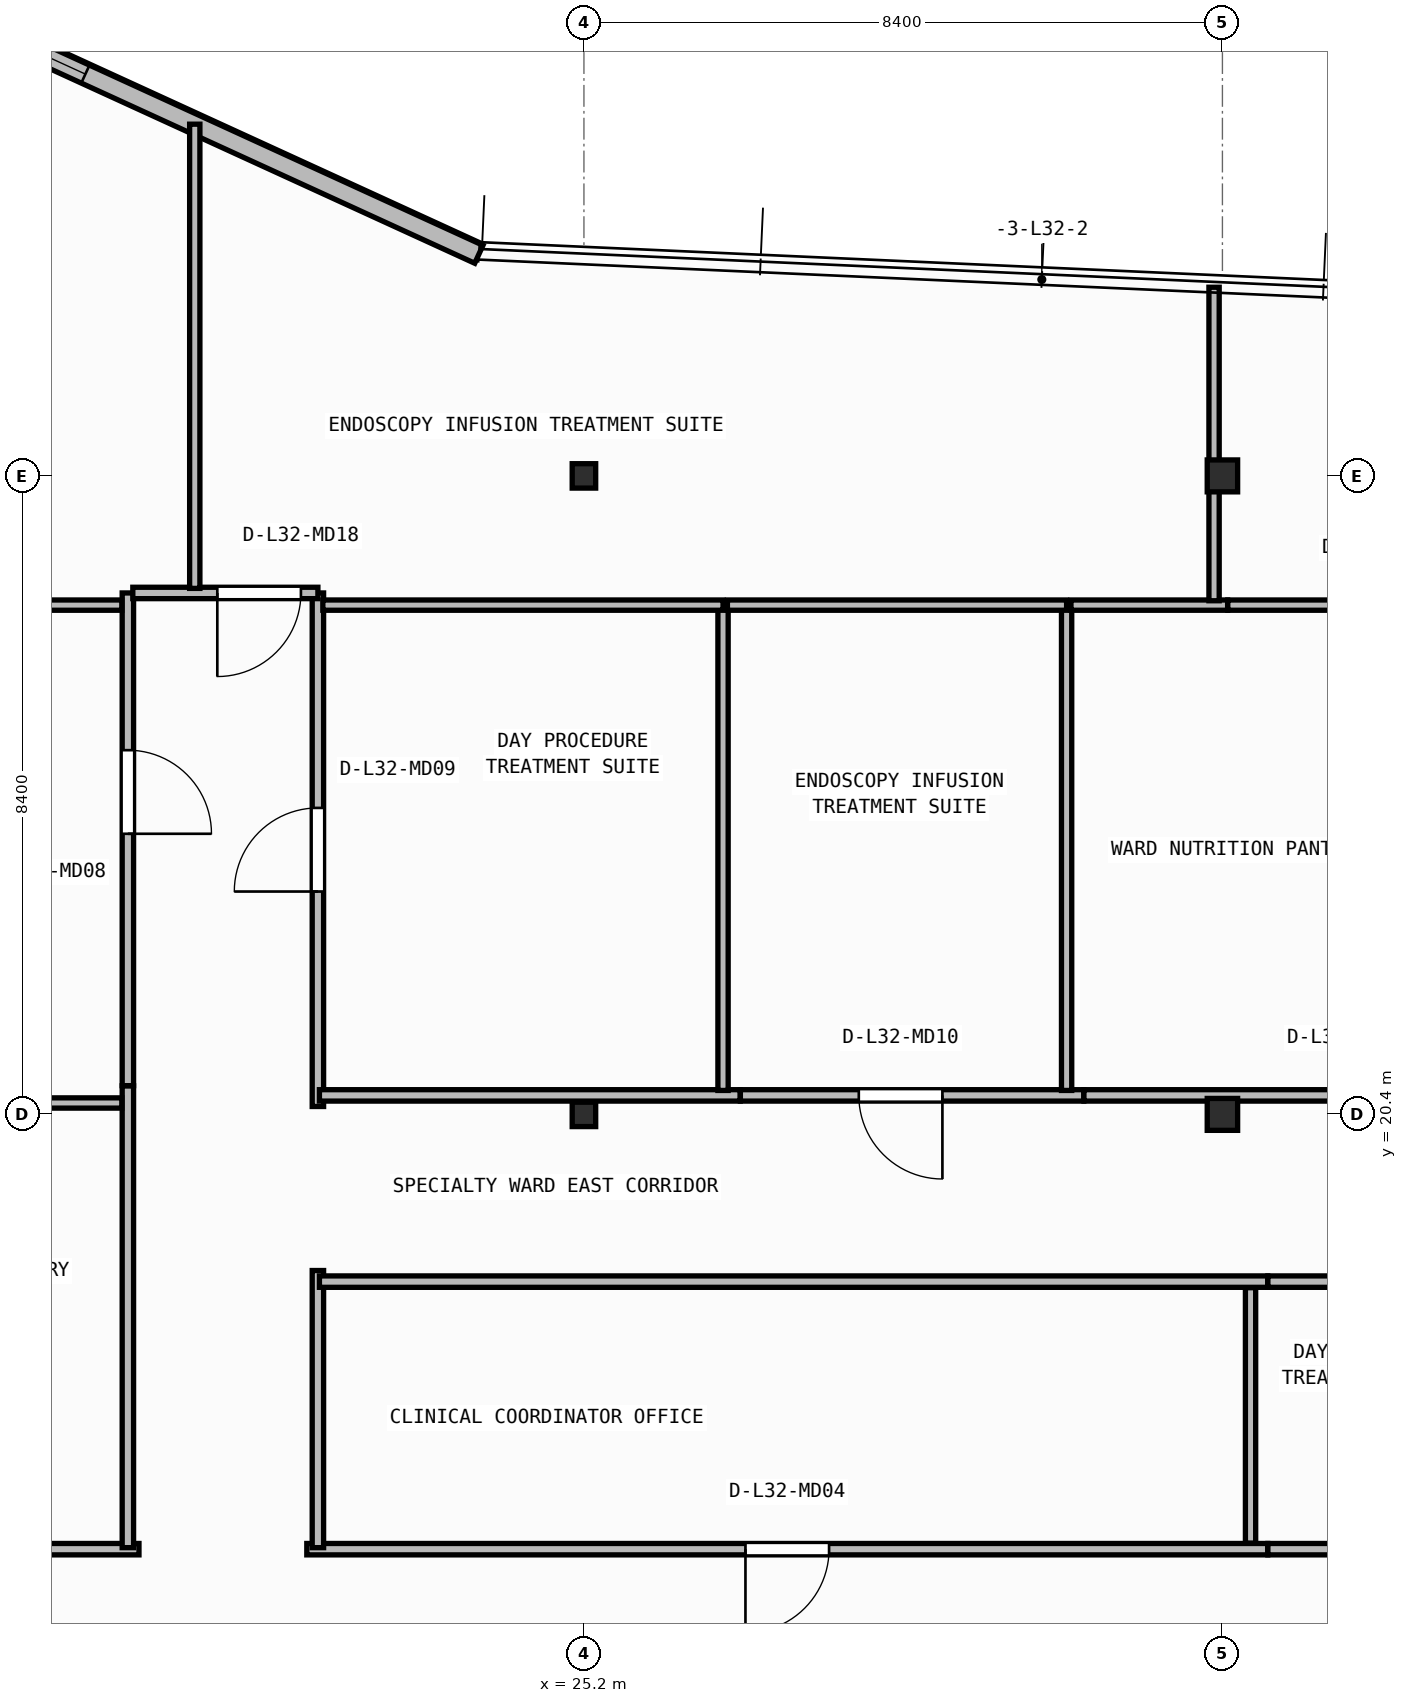
"""IFC4 building model, lengths in metres.
Left out: names, types, materials, properties, quantities, classifications, styles, units other than length and angle.
Written with IfcOpenShell. Run it as: python <this file> out.ifc"""

import sys

from ifc_helpers import new_model, si_unit, direction, frame, frame_2d, origin, origin_2d, place, context, subcontext, project, spatial, rectangle, i_section, extrude, element, fill, save


model = new_model("IFC4")
c1 = context("Model", 3, precision=1e-05, world=origin(), true_north=direction((0.0, 1.0)))
c2 = subcontext(c1, "Body", "Model", "MODEL_VIEW")
j1 = project(units=[si_unit("LENGTHUNIT", "METRE"), si_unit("PLANEANGLEUNIT", "RADIAN")], contexts=[c1])
p1 = place(None, origin())
s1 = spatial("IfcSite", under=j1, at=p1, CompositionType="ELEMENT")
p2 = place(p1, origin())
s2 = spatial("IfcBuilding", under=s1, at=p2, CompositionType="ELEMENT")
p3 = place(p2, frame((0.0, 0.0, 131.0)))
s3 = spatial("IfcBuildingStorey", under=s2, at=p3, CompositionType="ELEMENT", Elevation=131.0)
p4 = place(p3, frame((25.2, 20.4, 0.0), z_axis=(0.0, 0.0, 1.0), x_axis=(1.0, 0.0, 0.0)))
e1 = element("IfcColumn", 1, at=p4, inside=s3, PredefinedType="COLUMN", context=c2, shape_type="SweptSolid", body=[
    extrude(i_section(OverallWidth=0.309, OverallDepth=0.321, WebThickness=0.014, FlangeThickness=0.022, FilletRadius=0.017, at=origin_2d()), origin(), (0.0, 0.0, 1.0), 3.95),
])
p5 = place(p3, frame((33.6, 20.4, 0.0), z_axis=(0.0, 0.0, 1.0), x_axis=(1.0, 0.0, 0.0)))
e2 = element("IfcColumn", 2, at=p5, inside=s3, PredefinedType="COLUMN", context=c2, shape_type="SweptSolid", body=[
    extrude(i_section(OverallWidth=0.4, OverallDepth=0.42, WebThickness=0.025, FlangeThickness=0.04, at=origin_2d()), origin(), (0.0, 0.0, 1.0), 3.95),
])
p6 = place(p3, frame((25.2, 28.8, 0.0), z_axis=(0.0, 0.0, 1.0), x_axis=(1.0, 0.0, 0.0)))
e3 = element("IfcColumn", 3, at=p6, inside=s3, PredefinedType="COLUMN", context=c2, shape_type="SweptSolid", body=[
    extrude(i_section(OverallWidth=0.309, OverallDepth=0.321, WebThickness=0.014, FlangeThickness=0.022, FilletRadius=0.017, at=origin_2d()), origin(), (0.0, 0.0, 1.0), 3.95),
])
p7 = place(p3, frame((33.6, 28.8, 0.0), z_axis=(0.0, 0.0, 1.0), x_axis=(1.0, 0.0, 0.0)))
e4 = element("IfcColumn", 4, at=p7, inside=s3, PredefinedType="COLUMN", context=c2, shape_type="SweptSolid", body=[
    extrude(i_section(OverallWidth=0.4, OverallDepth=0.42, WebThickness=0.025, FlangeThickness=0.04, at=origin_2d()), origin(), (0.0, 0.0, 1.0), 3.95),
])
p8 = place(p3, frame((23.818, 31.716, 0.0), z_axis=(0.0, 0.0, 1.0), x_axis=(-0.909209527513, 0.416338846471, 0.0)))
e5 = element("IfcWall", 5, at=p8, inside=s3, PredefinedType="STANDARD", context=c2, shape_type="SweptSolid", body=[
    extrude(rectangle(XDim=13.787, YDim=0.26, at=frame_2d((6.894, 0.0))), origin(), (0.0, 0.0, 1.0), 3.71),
])
p9 = place(p8, frame((5.694, 0.0, 0.9)))
e6 = element("IfcOpeningElement", 6, at=p9, cuts=e5, PredefinedType="OPENING", context=c2, shape_type="SweptSolid", body=[
    extrude(rectangle(XDim=2.4, YDim=1.65, at=frame_2d((1.2, 0.825))), frame((0.0, 0.14, 0.0), z_axis=(0.0, -1.0, 0.0), x_axis=(1.0, 0.0, 0.0)), (0.0, 0.0, 1.0), 0.28),
])
p10 = place(p3, frame((19.346, 14.68, 0.0), z_axis=(0.0, 0.0, 1.0), x_axis=(-1.0, 0.0, 0.0)))
e7 = element("IfcWall", 7, at=p10, inside=s3, PredefinedType="PARTITIONING", context=c2, shape_type="SweptSolid", body=[
    extrude(rectangle(XDim=4.708, YDim=0.15, at=frame_2d((2.354, 0.0))), origin(), (0.0, 0.0, 1.0), 3.71),
])
p11 = place(p10, frame((1.804, 0.0, 0.0)))
e8 = element("IfcOpeningElement", 8, at=p11, cuts=e7, PredefinedType="OPENING", context=c2, shape_type="SweptSolid", body=[
    extrude(rectangle(XDim=1.1, YDim=2.1, at=frame_2d((0.55, 1.05))), frame((0.0, 0.085, 0.0), z_axis=(0.0, -1.0, 0.0), x_axis=(1.0, 0.0, 0.0)), (0.0, 0.0, 1.0), 0.17),
])
p12 = place(p3, frame((34.196, 14.68, 0.0), z_axis=(0.0, 0.0, 1.0), x_axis=(-1.0, 0.0, 0.0)))
e9 = element("IfcWall", 9, at=p12, inside=s3, PredefinedType="PARTITIONING", context=c2, shape_type="SweptSolid", body=[
    extrude(rectangle(XDim=12.642, YDim=0.15, at=frame_2d((6.321, 0.0))), origin(), (0.0, 0.0, 1.0), 3.71),
])
p13 = place(p12, frame((5.771, 0.0, 0.0)))
e10 = element("IfcOpeningElement", 10, at=p13, cuts=e9, PredefinedType="OPENING", context=c2, shape_type="SweptSolid", body=[
    extrude(rectangle(XDim=1.1, YDim=2.1, at=frame_2d((0.55, 1.05))), frame((0.0, 0.085, 0.0), z_axis=(0.0, -1.0, 0.0), x_axis=(1.0, 0.0, 0.0)), (0.0, 0.0, 1.0), 0.17),
])
p14 = place(p3, frame((39.336, 14.68, 0.0), z_axis=(0.0, 0.0, 1.0), x_axis=(-1.0, 0.0, 0.0)))
e11 = element("IfcWall", 11, at=p14, inside=s3, PredefinedType="PARTITIONING", context=c2, shape_type="SweptSolid", body=[
    extrude(rectangle(XDim=5.138, YDim=0.15, at=frame_2d((2.569, 0.0))), origin(), (0.0, 0.0, 1.0), 3.71),
])
p15 = place(p14, frame((2.019, 0.0, 0.0)))
e12 = element("IfcOpeningElement", 12, at=p15, cuts=e11, PredefinedType="OPENING", context=c2, shape_type="SweptSolid", body=[
    extrude(rectangle(XDim=1.1, YDim=2.1, at=frame_2d((0.55, 1.05))), frame((0.0, 0.085, 0.0), z_axis=(0.0, -1.0, 0.0), x_axis=(1.0, 0.0, 0.0)), (0.0, 0.0, 1.0), 0.17),
])
p16 = place(p3, frame((19.2, 20.776, 0.0), z_axis=(0.0, 0.0, 1.0), x_axis=(0.0, -1.0, 0.0)))
e13 = element("IfcWall", 13, at=p16, inside=s3, PredefinedType="PARTITIONING", context=c2, shape_type="SweptSolid", body=[
    extrude(rectangle(XDim=6.076, YDim=0.15, at=frame_2d((3.038, 0.0))), origin(), (0.0, 0.0, 1.0), 3.71),
])
p17 = place(p3, frame((21.7, 14.7, 0.0), z_axis=(0.0, 0.0, 1.0), x_axis=(0.0, 1.0, 0.0)))
e14 = element("IfcWall", 14, at=p17, inside=s3, PredefinedType="PARTITIONING", context=c2, shape_type="SweptSolid", body=[
    extrude(rectangle(XDim=3.646, YDim=0.15, at=frame_2d((1.823, 0.0))), origin(), (0.0, 0.0, 1.0), 3.71),
])
p18 = place(p3, frame((19.2, 27.26, 0.0), z_axis=(0.0, 0.0, 1.0), x_axis=(0.0, -1.0, 0.0)))
e15 = element("IfcWall", 15, at=p18, inside=s3, PredefinedType="PARTITIONING", context=c2, shape_type="SweptSolid", body=[
    extrude(rectangle(XDim=6.482, YDim=0.15, at=frame_2d((3.241, 0.0))), origin(), (0.0, 0.0, 1.0), 3.71),
])
p19 = place(p18, frame((2.068, 0.0, 0.0)))
e16 = element("IfcOpeningElement", 16, at=p19, cuts=e15, PredefinedType="OPENING", context=c2, shape_type="SweptSolid", body=[
    extrude(rectangle(XDim=1.1, YDim=2.1, at=frame_2d((0.55, 1.05))), frame((0.0, 0.085, 0.0), z_axis=(0.0, -1.0, 0.0), x_axis=(1.0, 0.0, 0.0)), (0.0, 0.0, 1.0), 0.17),
])
p20 = place(p3, frame((21.7, 20.504, 0.0), z_axis=(0.0, 0.0, 1.0), x_axis=(0.0, 1.0, 0.0)))
e17 = element("IfcWall", 17, at=p20, inside=s3, PredefinedType="PARTITIONING", context=c2, shape_type="SweptSolid", body=[
    extrude(rectangle(XDim=6.756, YDim=0.15, at=frame_2d((3.378, 0.0))), origin(), (0.0, 0.0, 1.0), 3.71),
])
p21 = place(p20, frame((2.828, 0.0, 0.0)))
e18 = element("IfcOpeningElement", 18, at=p21, cuts=e17, PredefinedType="OPENING", context=c2, shape_type="SweptSolid", body=[
    extrude(rectangle(XDim=1.1, YDim=2.1, at=frame_2d((0.55, 1.05))), frame((0.0, 0.085, 0.0), z_axis=(0.0, -1.0, 0.0), x_axis=(1.0, 0.0, 0.0)), (0.0, 0.0, 1.0), 0.17),
])
p22 = place(p3, frame((21.7, 27.26, 0.0), z_axis=(0.0, 0.0, 1.0), x_axis=(-1.0, 0.0, 0.0)))
e19 = element("IfcWall", 19, at=p22, inside=s3, PredefinedType="PARTITIONING", context=c2, shape_type="SweptSolid", body=[
    extrude(rectangle(XDim=2.435, YDim=0.15, at=frame_2d((1.218, 0.0))), origin(), (0.0, 0.0, 1.0), 3.71),
])
p23 = place(p22, frame((0.223, 0.0, 0.0)))
e20 = element("IfcOpeningElement", 20, at=p23, cuts=e19, PredefinedType="OPENING", context=c2, shape_type="SweptSolid", body=[
    extrude(rectangle(XDim=1.1, YDim=2.1, at=frame_2d((0.55, 1.05))), frame((0.0, 0.085, 0.0), z_axis=(0.0, -1.0, 0.0), x_axis=(1.0, 0.0, 0.0)), (0.0, 0.0, 1.0), 0.17),
])
p24 = place(p3, frame((21.72, 18.2, 0.0), z_axis=(0.0, 0.0, 1.0), x_axis=(1.0, 0.0, 0.0)))
e21 = element("IfcWall", 21, at=p24, inside=s3, PredefinedType="PARTITIONING", context=c2, shape_type="SweptSolid", body=[
    extrude(rectangle(XDim=12.476, YDim=0.15, at=frame_2d((6.238, 0.0))), origin(), (0.0, 0.0, 1.0), 3.71),
])
p25 = place(p3, frame((34.198, 18.2, 0.0), z_axis=(0.0, 0.0, 1.0), x_axis=(1.0, 0.0, 0.0)))
e22 = element("IfcWall", 22, at=p25, inside=s3, PredefinedType="PARTITIONING", context=c2, shape_type="SweptSolid", body=[
    extrude(rectangle(XDim=5.138, YDim=0.15, at=frame_2d((2.569, 0.0))), origin(), (0.0, 0.0, 1.0), 3.71),
])
p26 = place(p3, frame((27.256, 20.65, 0.0), z_axis=(0.0, 0.0, 1.0), x_axis=(-1.0, 0.0, 0.0)))
e23 = element("IfcWall", 23, at=p26, inside=s3, PredefinedType="PARTITIONING", context=c2, shape_type="SweptSolid", body=[
    extrude(rectangle(XDim=5.536, YDim=0.15, at=frame_2d((2.768, 0.0))), origin(), (0.0, 0.0, 1.0), 3.083),
])
p27 = place(p3, frame((31.776, 20.65, 0.0), z_axis=(0.0, 0.0, 1.0), x_axis=(-1.0, 0.0, 0.0)))
e24 = element("IfcWall", 24, at=p27, inside=s3, PredefinedType="PARTITIONING", context=c2, shape_type="SweptSolid", body=[
    extrude(rectangle(XDim=4.518, YDim=0.15, at=frame_2d((2.259, 0.0))), origin(), (0.0, 0.0, 1.0), 3.083),
])
p28 = place(p27, frame((1.86, 0.0, 0.0)))
e25 = element("IfcOpeningElement", 25, at=p28, cuts=e24, PredefinedType="OPENING", context=c2, shape_type="SweptSolid", body=[
    extrude(rectangle(XDim=1.1, YDim=2.1, at=frame_2d((0.55, 1.05))), frame((0.0, 0.085, 0.0), z_axis=(0.0, -1.0, 0.0), x_axis=(1.0, 0.0, 0.0)), (0.0, 0.0, 1.0), 0.17),
])
p29 = place(p3, frame((36.686, 20.65, 0.0), z_axis=(0.0, 0.0, 1.0), x_axis=(-1.0, 0.0, 0.0)))
e26 = element("IfcWall", 26, at=p29, inside=s3, PredefinedType="PARTITIONING", context=c2, shape_type="SweptSolid", body=[
    extrude(rectangle(XDim=4.908, YDim=0.15, at=frame_2d((2.454, 0.0))), origin(), (0.0, 0.0, 1.0), 3.083),
])
p30 = place(p29, frame((0.37, 0.0, 0.0)))
e27 = element("IfcOpeningElement", 27, at=p30, cuts=e26, PredefinedType="OPENING", context=c2, shape_type="SweptSolid", body=[
    extrude(rectangle(XDim=1.1, YDim=2.1, at=frame_2d((0.55, 1.05))), frame((0.0, 0.085, 0.0), z_axis=(0.0, -1.0, 0.0), x_axis=(1.0, 0.0, 0.0)), (0.0, 0.0, 1.0), 0.17),
])
p31 = place(p3, frame((19.12, 20.55, 0.0), z_axis=(0.0, 0.0, 1.0), x_axis=(-1.0, 0.0, 0.0)))
e28 = element("IfcWall", 28, at=p31, inside=s3, PredefinedType="PARTITIONING", context=c2, shape_type="SweptSolid", body=[
    extrude(rectangle(XDim=4.653, YDim=0.135, at=frame_2d((2.326, 0.0))), origin(), (0.0, 0.0, 1.0), 3.083),
])
p32 = place(p3, frame((33.97, 14.76, 0.0), z_axis=(0.0, 0.0, 1.0), x_axis=(0.0, 1.0, 0.0)))
e29 = element("IfcWall", 29, at=p32, inside=s3, PredefinedType="PARTITIONING", context=c2, shape_type="SweptSolid", body=[
    extrude(rectangle(XDim=3.36, YDim=0.135, at=frame_2d((1.68, 0.0))), origin(), (0.0, 0.0, 1.0), 3.152),
])
p33 = place(p3, frame((19.12, 27.1, 0.0), z_axis=(0.0, 0.0, 1.0), x_axis=(-1.0, 0.0, 0.0)))
e30 = element("IfcWall", 30, at=p33, inside=s3, PredefinedType="PARTITIONING", context=c2, shape_type="SweptSolid", body=[
    extrude(rectangle(XDim=10.653, YDim=0.135, at=frame_2d((5.326, 0.0))), origin(), (0.0, 0.0, 1.0), 3.71),
])
p34 = place(p33, frame((5.92, 0.0, 0.0)))
e31 = element("IfcOpeningElement", 31, at=p34, cuts=e30, PredefinedType="OPENING", context=c2, shape_type="SweptSolid", body=[
    extrude(rectangle(XDim=1.1, YDim=2.1, at=frame_2d((0.55, 1.05))), frame((0.0, 0.077, 0.0), z_axis=(0.0, -1.0, 0.0), x_axis=(1.0, 0.0, 0.0)), (0.0, 0.0, 1.0), 0.155),
])
p35 = place(p3, frame((27.03, 20.715, 0.0), z_axis=(0.0, 0.0, 1.0), x_axis=(0.0, 1.0, 0.0)))
e32 = element("IfcWall", 32, at=p35, inside=s3, PredefinedType="PARTITIONING", context=c2, shape_type="SweptSolid", body=[
    extrude(rectangle(XDim=6.385, YDim=0.135, at=frame_2d((3.192, 0.0))), origin(), (0.0, 0.0, 1.0), 3.71),
])
p36 = place(p3, frame((27.03, 27.1, 0.0), z_axis=(0.0, 0.0, 1.0), x_axis=(-1.0, 0.0, 0.0)))
e33 = element("IfcWall", 33, at=p36, inside=s3, PredefinedType="PARTITIONING", context=c2, shape_type="SweptSolid", body=[
    extrude(rectangle(XDim=5.265, YDim=0.135, at=frame_2d((2.633, 0.0))), origin(), (0.0, 0.0, 1.0), 3.71),
])
p37 = place(p3, frame((31.55, 20.715, 0.0), z_axis=(0.0, 0.0, 1.0), x_axis=(0.0, 1.0, 0.0)))
e34 = element("IfcWall", 34, at=p37, inside=s3, PredefinedType="PARTITIONING", context=c2, shape_type="SweptSolid", body=[
    extrude(rectangle(XDim=6.385, YDim=0.135, at=frame_2d((3.192, 0.0))), origin(), (0.0, 0.0, 1.0), 3.71),
])
p38 = place(p3, frame((31.55, 27.1, 0.0), z_axis=(0.0, 0.0, 1.0), x_axis=(-1.0, 0.0, 0.0)))
e35 = element("IfcWall", 35, at=p38, inside=s3, PredefinedType="PARTITIONING", context=c2, shape_type="SweptSolid", body=[
    extrude(rectangle(XDim=4.463, YDim=0.135, at=frame_2d((2.231, 0.0))), origin(), (0.0, 0.0, 1.0), 3.71),
])
p39 = place(p3, frame((33.668, 27.1, 0.0), z_axis=(0.0, 0.0, 1.0), x_axis=(-1.0, 0.0, 0.0)))
e36 = element("IfcWall", 36, at=p39, inside=s3, PredefinedType="PARTITIONING", context=c2, shape_type="SweptSolid", body=[
    extrude(rectangle(XDim=2.061, YDim=0.135, at=frame_2d((1.031, 0.0))), origin(), (0.0, 0.0, 1.0), 3.71),
])
p40 = place(p3, frame((36.46, 27.1, 0.0), z_axis=(0.0, 0.0, 1.0), x_axis=(-1.0, 0.0, 0.0)))
e37 = element("IfcWall", 37, at=p40, inside=s3, PredefinedType="PARTITIONING", context=c2, shape_type="SweptSolid", body=[
    extrude(rectangle(XDim=2.79, YDim=0.135, at=frame_2d((1.395, 0.0))), origin(), (0.0, 0.0, 1.0), 3.71),
])
p41 = place(p40, frame((0.232, 0.0, 0.0)))
e38 = element("IfcOpeningElement", 38, at=p41, cuts=e37, PredefinedType="OPENING", context=c2, shape_type="SweptSolid", body=[
    extrude(rectangle(XDim=1.1, YDim=2.1, at=frame_2d((0.55, 1.05))), frame((0.0, 0.077, 0.0), z_axis=(0.0, -1.0, 0.0), x_axis=(1.0, 0.0, 0.0)), (0.0, 0.0, 1.0), 0.155),
])
p42 = place(p3, frame((20.08, 27.32, 0.0), z_axis=(0.0, 0.0, 1.0), x_axis=(0.0, 1.0, 0.0)))
e39 = element("IfcWall", 39, at=p42, inside=s3, PredefinedType="PARTITIONING", context=c2, shape_type="SweptSolid", body=[
    extrude(rectangle(XDim=6.107, YDim=0.135, at=frame_2d((3.053, 0.0))), origin(), (0.0, 0.0, 1.0), 3.71),
])
p43 = place(p3, frame((33.49, 27.157, 0.0), z_axis=(0.0, 0.0, 1.0), x_axis=(0.0, 1.0, 0.0)))
e40 = element("IfcWall", 40, at=p43, inside=s3, PredefinedType="PARTITIONING", context=c2, shape_type="SweptSolid", body=[
    extrude(rectangle(XDim=4.125, YDim=0.135, at=frame_2d((2.062, 0.0))), origin(), (0.0, 0.0, 1.0), 3.152),
])
p44 = place(p9, origin())
e41 = element("IfcWindow", 41, at=p44, inside=s3, PartitioningType="SINGLE_PANEL", PredefinedType="WINDOW", context=c2, shape_type="SweptSolid", body=[
    extrude(rectangle(XDim=2.4, YDim=1.65, at=frame_2d((1.2, 0.825))), frame((0.0, 0.03, 0.0), z_axis=(0.0, -1.0, 0.0), x_axis=(1.0, 0.0, 0.0)), (0.0, 0.0, 1.0), 0.06),
])
fill(e6, e41)
p45 = place(p13, origin())
e42 = element("IfcDoor", 42, at=p45, inside=s3, OperationType="SINGLE_SWING_RIGHT", PredefinedType="DOOR", context=c2, shape_type="SweptSolid", body=[
    extrude(rectangle(XDim=1.1, YDim=2.1, at=frame_2d((0.55, 1.05))), frame((0.0, 0.025, 0.0), z_axis=(0.0, -1.0, 0.0), x_axis=(1.0, 0.0, 0.0)), (0.0, 0.0, 1.0), 0.05),
])
fill(e10, e42)
p46 = place(p19, origin())
e43 = element("IfcDoor", 43, at=p46, inside=s3, OperationType="SINGLE_SWING_RIGHT", PredefinedType="DOOR", context=c2, shape_type="SweptSolid", body=[
    extrude(rectangle(XDim=1.1, YDim=2.1, at=frame_2d((0.55, 1.05))), frame((0.0, 0.025, 0.0), z_axis=(0.0, -1.0, 0.0), x_axis=(1.0, 0.0, 0.0)), (0.0, 0.0, 1.0), 0.05),
])
fill(e16, e43)
p47 = place(p21, origin())
e44 = element("IfcDoor", 44, at=p47, inside=s3, OperationType="SINGLE_SWING_LEFT", PredefinedType="DOOR", context=c2, shape_type="SweptSolid", body=[
    extrude(rectangle(XDim=1.1, YDim=2.1, at=frame_2d((0.55, 1.05))), frame((0.0, 0.025, 0.0), z_axis=(0.0, -1.0, 0.0), x_axis=(1.0, 0.0, 0.0)), (0.0, 0.0, 1.0), 0.05),
])
fill(e18, e44)
p48 = place(p23, origin())
e45 = element("IfcDoor", 45, at=p48, inside=s3, OperationType="SINGLE_SWING_RIGHT", PredefinedType="DOOR", context=c2, shape_type="SweptSolid", body=[
    extrude(rectangle(XDim=1.1, YDim=2.1, at=frame_2d((0.55, 1.05))), frame((0.0, 0.025, 0.0), z_axis=(0.0, -1.0, 0.0), x_axis=(1.0, 0.0, 0.0)), (0.0, 0.0, 1.0), 0.05),
])
fill(e20, e45)
p49 = place(p28, origin())
e46 = element("IfcDoor", 46, at=p49, inside=s3, OperationType="SINGLE_SWING_LEFT", PredefinedType="DOOR", context=c2, shape_type="SweptSolid", body=[
    extrude(rectangle(XDim=1.1, YDim=2.1, at=frame_2d((0.55, 1.05))), frame((0.0, 0.025, 0.0), z_axis=(0.0, -1.0, 0.0), x_axis=(1.0, 0.0, 0.0)), (0.0, 0.0, 1.0), 0.05),
])
fill(e25, e46)
save(model, sys.argv[1])
